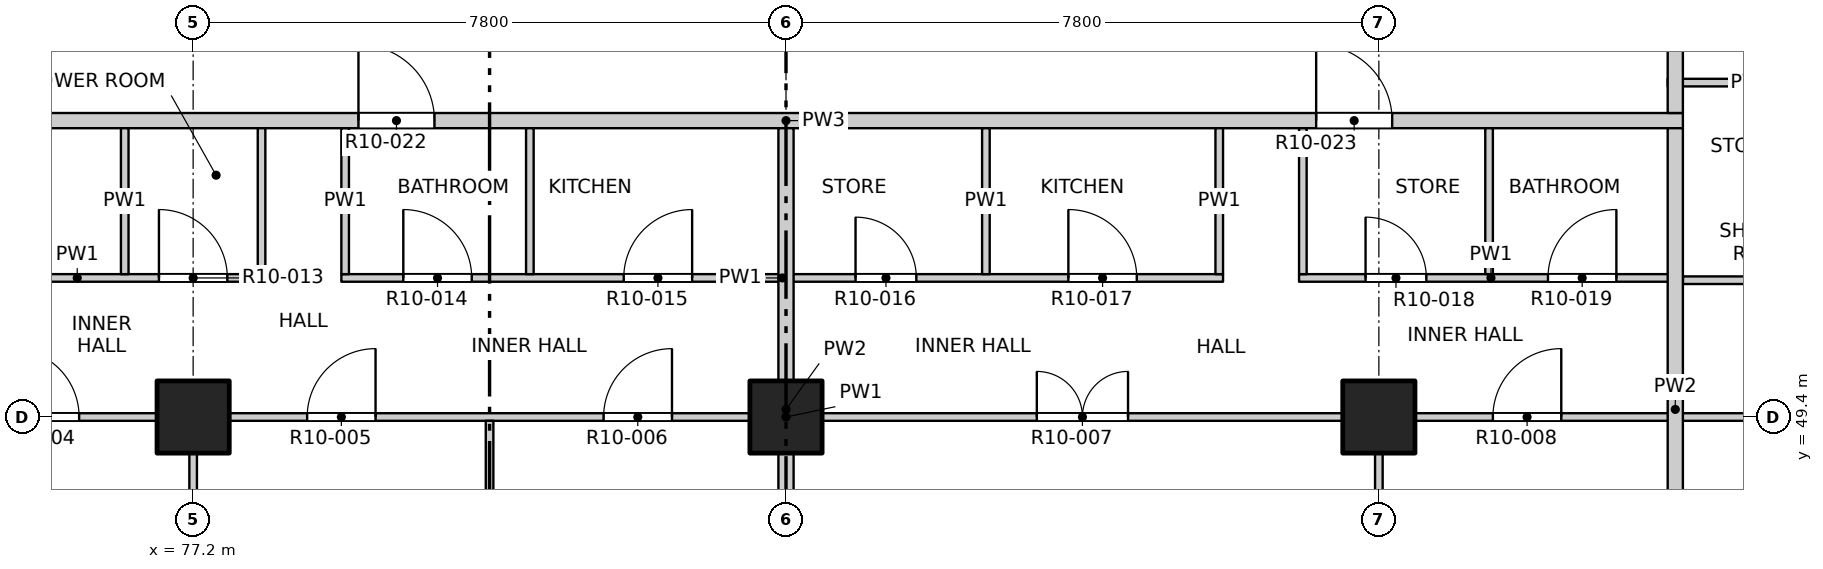
"""IFC4 building model, lengths in metres.
Left out: names, types, materials, properties, quantities, classifications, styles, units other than length and angle.
Written with IfcOpenShell. Run it as: python <this file> out.ifc"""

import sys

from ifc_helpers import new_model, si_unit, direction, frame, frame_2d, origin, origin_2d, place, context, subcontext, project, spatial, rectangle, extrude, element, fill, save


model = new_model("IFC4")
c1 = context("Model", 3, precision=1e-05, world=origin(), true_north=direction((0.0, 1.0)))
c2 = subcontext(c1, "Body", "Model", "MODEL_VIEW")
j1 = project(units=[si_unit("LENGTHUNIT", "METRE"), si_unit("PLANEANGLEUNIT", "RADIAN")], contexts=[c1])
p1 = place(None, origin())
s1 = spatial("IfcSite", under=j1, at=p1, CompositionType="ELEMENT")
p2 = place(p1, origin())
s2 = spatial("IfcBuilding", under=s1, at=p2, CompositionType="ELEMENT")
p3 = place(p2, frame((0.0, 0.0, 127.1)))
s3 = spatial("IfcBuildingStorey", under=s2, at=p3, CompositionType="ELEMENT", Elevation=127.1)
for number, where, z_axis, x_axis in (
    (1, (77.2, 49.4, -0.25), (0.0, 0.0, 1.0), (1.0, 0.0, 0.0)),
    (2, (85.0, 49.4, -0.25), (0.0, 0.0, 1.0), (1.0, 0.0, 0.0)),
    (3, (92.8, 49.4, -0.25), (0.0, 0.0, 1.0), (1.0, 0.0, 0.0)),
):
    element("IfcColumn", number, at=place(p3, frame(where, z_axis=z_axis, x_axis=x_axis)), inside=s3, PredefinedType="COLUMN", context=c2, shape_type="SweptSolid", body=[
        extrude(rectangle(XDim=0.95, YDim=0.95, at=origin_2d()), origin(), (0.0, 0.0, 1.0), 3.4),
    ])
p4 = place(p3, frame((65.8, 49.4, 0.0), z_axis=(0.0, 0.0, 1.0), x_axis=(1.0, 0.0, 0.0)))
e4 = element("IfcWall", 4, at=p4, inside=s3, PredefinedType="PARTITIONING", context=c2, shape_type="SweptSolid", body=[
    extrude(rectangle(XDim=38.4, YDim=0.1, at=frame_2d((19.2, 0.0))), origin(), (0.0, 0.0, 1.0), 3.15),
])
p5 = place(p4, frame((4.19, 0.0, 0.0)))
e5 = element("IfcOpeningElement", 5, at=p5, cuts=e4, PredefinedType="OPENING", context=c2, shape_type="SweptSolid", body=[
    extrude(rectangle(XDim=0.9, YDim=2.1, at=frame_2d((0.45, 1.05))), frame((0.0, 0.06, 0.0), z_axis=(0.0, -1.0, 0.0), x_axis=(1.0, 0.0, 0.0)), (0.0, 0.0, 1.0), 0.12),
])
p6 = place(p4, frame((9.0, 0.0, 0.0)))
e6 = element("IfcOpeningElement", 6, at=p6, cuts=e4, PredefinedType="OPENING", context=c2, shape_type="SweptSolid", body=[
    extrude(rectangle(XDim=0.9, YDim=2.1, at=frame_2d((0.45, 1.05))), frame((0.0, 0.06, 0.0), z_axis=(0.0, -1.0, 0.0), x_axis=(1.0, 0.0, 0.0)), (0.0, 0.0, 1.0), 0.12),
])
p7 = place(p4, frame((12.9, 0.0, 0.0)))
e7 = element("IfcOpeningElement", 7, at=p7, cuts=e4, PredefinedType="OPENING", context=c2, shape_type="SweptSolid", body=[
    extrude(rectangle(XDim=0.9, YDim=2.1, at=frame_2d((0.45, 1.05))), frame((0.0, 0.06, 0.0), z_axis=(0.0, -1.0, 0.0), x_axis=(1.0, 0.0, 0.0)), (0.0, 0.0, 1.0), 0.12),
])
p8 = place(p4, frame((16.8, 0.0, 0.0)))
e8 = element("IfcOpeningElement", 8, at=p8, cuts=e4, PredefinedType="OPENING", context=c2, shape_type="SweptSolid", body=[
    extrude(rectangle(XDim=0.9, YDim=2.1, at=frame_2d((0.45, 1.05))), frame((0.0, 0.06, 0.0), z_axis=(0.0, -1.0, 0.0), x_axis=(1.0, 0.0, 0.0)), (0.0, 0.0, 1.0), 0.12),
])
p9 = place(p4, frame((22.5, 0.0, 0.0)))
e9 = element("IfcOpeningElement", 9, at=p9, cuts=e4, PredefinedType="OPENING", context=c2, shape_type="SweptSolid", body=[
    extrude(rectangle(XDim=1.2, YDim=2.1, at=frame_2d((0.6, 1.05))), frame((0.0, 0.06, 0.0), z_axis=(0.0, -1.0, 0.0), x_axis=(1.0, 0.0, 0.0)), (0.0, 0.0, 1.0), 0.12),
])
p10 = place(p4, frame((28.5, 0.0, 0.0)))
e10 = element("IfcOpeningElement", 10, at=p10, cuts=e4, PredefinedType="OPENING", context=c2, shape_type="SweptSolid", body=[
    extrude(rectangle(XDim=0.9, YDim=2.1, at=frame_2d((0.45, 1.05))), frame((0.0, 0.06, 0.0), z_axis=(0.0, -1.0, 0.0), x_axis=(1.0, 0.0, 0.0)), (0.0, 0.0, 1.0), 0.12),
])
p11 = place(p4, frame((33.31, 0.0, 0.0)))
e11 = element("IfcOpeningElement", 11, at=p11, cuts=e4, PredefinedType="OPENING", context=c2, shape_type="SweptSolid", body=[
    extrude(rectangle(XDim=0.9, YDim=2.1, at=frame_2d((0.45, 1.05))), frame((0.0, 0.06, 0.0), z_axis=(0.0, -1.0, 0.0), x_axis=(1.0, 0.0, 0.0)), (0.0, 0.0, 1.0), 0.12),
])
p12 = place(p3, frame((96.8, 51.2, 0.0), z_axis=(0.0, 0.0, 1.0), x_axis=(1.0, 0.0, 0.0)))
e12 = element("IfcWall", 12, at=p12, inside=s3, PredefinedType="PARTITIONING", context=c2, shape_type="SweptSolid", body=[
    extrude(rectangle(XDim=2.02, YDim=0.1, at=frame_2d((1.01, 0.0))), origin(), (0.0, 0.0, 1.0), 3.15),
])
p13 = place(p3, frame((73.2, 51.23, 0.0), z_axis=(0.0, 0.0, 1.0), x_axis=(1.0, 0.0, 0.0)))
e13 = element("IfcWall", 13, at=p13, inside=s3, PredefinedType="PARTITIONING", context=c2, shape_type="SweptSolid", body=[
    extrude(rectangle(XDim=4.95, YDim=0.1, at=frame_2d((2.475, 0.0))), origin(), (0.0, 0.0, 1.0), 3.15),
])
p14 = place(p13, frame((1.2, 0.0, 0.0)))
e14 = element("IfcOpeningElement", 14, at=p14, cuts=e13, PredefinedType="OPENING", context=c2, shape_type="SweptSolid", body=[
    extrude(rectangle(XDim=0.8, YDim=2.1, at=frame_2d((0.4, 1.05))), frame((0.0, 0.06, 0.0), z_axis=(0.0, -1.0, 0.0), x_axis=(1.0, 0.0, 0.0)), (0.0, 0.0, 1.0), 0.12),
])
p15 = place(p13, frame((3.55, 0.0, 0.0)))
e15 = element("IfcOpeningElement", 15, at=p15, cuts=e13, PredefinedType="OPENING", context=c2, shape_type="SweptSolid", body=[
    extrude(rectangle(XDim=0.9, YDim=2.1, at=frame_2d((0.45, 1.05))), frame((0.0, 0.06, 0.0), z_axis=(0.0, -1.0, 0.0), x_axis=(1.0, 0.0, 0.0)), (0.0, 0.0, 1.0), 0.12),
])
p16 = place(p3, frame((79.15, 51.23, 0.0), z_axis=(0.0, 0.0, 1.0), x_axis=(1.0, 0.0, 0.0)))
e16 = element("IfcWall", 16, at=p16, inside=s3, PredefinedType="PARTITIONING", context=c2, shape_type="SweptSolid", body=[
    extrude(rectangle(XDim=11.6, YDim=0.1, at=frame_2d((5.8, 0.0))), origin(), (0.0, 0.0, 1.0), 3.15),
])
p17 = place(p16, frame((0.815, 0.0, 0.0)))
e17 = element("IfcOpeningElement", 17, at=p17, cuts=e16, PredefinedType="OPENING", context=c2, shape_type="SweptSolid", body=[
    extrude(rectangle(XDim=0.9, YDim=2.1, at=frame_2d((0.45, 1.05))), frame((0.0, 0.06, 0.0), z_axis=(0.0, -1.0, 0.0), x_axis=(1.0, 0.0, 0.0)), (0.0, 0.0, 1.0), 0.12),
])
p18 = place(p16, frame((3.715, 0.0, 0.0)))
e18 = element("IfcOpeningElement", 18, at=p18, cuts=e16, PredefinedType="OPENING", context=c2, shape_type="SweptSolid", body=[
    extrude(rectangle(XDim=0.9, YDim=2.1, at=frame_2d((0.45, 1.05))), frame((0.0, 0.06, 0.0), z_axis=(0.0, -1.0, 0.0), x_axis=(1.0, 0.0, 0.0)), (0.0, 0.0, 1.0), 0.12),
])
p19 = place(p16, frame((6.765, 0.0, 0.0)))
e19 = element("IfcOpeningElement", 19, at=p19, cuts=e16, PredefinedType="OPENING", context=c2, shape_type="SweptSolid", body=[
    extrude(rectangle(XDim=0.8, YDim=2.1, at=frame_2d((0.4, 1.05))), frame((0.0, 0.06, 0.0), z_axis=(0.0, -1.0, 0.0), x_axis=(1.0, 0.0, 0.0)), (0.0, 0.0, 1.0), 0.12),
])
p20 = place(p16, frame((9.565, 0.0, 0.0)))
e20 = element("IfcOpeningElement", 20, at=p20, cuts=e16, PredefinedType="OPENING", context=c2, shape_type="SweptSolid", body=[
    extrude(rectangle(XDim=0.9, YDim=2.1, at=frame_2d((0.45, 1.05))), frame((0.0, 0.06, 0.0), z_axis=(0.0, -1.0, 0.0), x_axis=(1.0, 0.0, 0.0)), (0.0, 0.0, 1.0), 0.12),
])
p21 = place(p3, frame((91.75, 51.23, 0.0), z_axis=(0.0, 0.0, 1.0), x_axis=(1.0, 0.0, 0.0)))
e21 = element("IfcWall", 21, at=p21, inside=s3, PredefinedType="PARTITIONING", context=c2, shape_type="SweptSolid", body=[
    extrude(rectangle(XDim=5.05, YDim=0.1, at=frame_2d((2.525, 0.0))), origin(), (0.0, 0.0, 1.0), 3.15),
])
p22 = place(p21, frame((0.875, 0.0, 0.0)))
e22 = element("IfcOpeningElement", 22, at=p22, cuts=e21, PredefinedType="OPENING", context=c2, shape_type="SweptSolid", body=[
    extrude(rectangle(XDim=0.8, YDim=2.1, at=frame_2d((0.4, 1.05))), frame((0.0, 0.06, 0.0), z_axis=(0.0, -1.0, 0.0), x_axis=(1.0, 0.0, 0.0)), (0.0, 0.0, 1.0), 0.12),
])
p23 = place(p21, frame((3.275, 0.0, 0.0)))
e23 = element("IfcOpeningElement", 23, at=p23, cuts=e21, PredefinedType="OPENING", context=c2, shape_type="SweptSolid", body=[
    extrude(rectangle(XDim=0.9, YDim=2.1, at=frame_2d((0.45, 1.05))), frame((0.0, 0.06, 0.0), z_axis=(0.0, -1.0, 0.0), x_axis=(1.0, 0.0, 0.0)), (0.0, 0.0, 1.0), 0.12),
])
p24 = place(p3, frame((73.2, 53.3, 0.0), z_axis=(0.0, 0.0, 1.0), x_axis=(1.0, 0.0, 0.0)))
e24 = element("IfcWall", 24, at=p24, inside=s3, PredefinedType="PARTITIONING", context=c2, shape_type="SweptSolid", body=[
    extrude(rectangle(XDim=23.6, YDim=0.2, at=frame_2d((11.8, 0.0))), origin(), (0.0, 0.0, 1.0), 3.15),
])
p25 = place(p24, frame((6.175, 0.0, 0.0)))
e25 = element("IfcOpeningElement", 25, at=p25, cuts=e24, PredefinedType="OPENING", context=c2, shape_type="SweptSolid", body=[
    extrude(rectangle(XDim=1.0, YDim=2.1, at=frame_2d((0.5, 1.05))), frame((0.0, 0.11, 0.0), z_axis=(0.0, -1.0, 0.0), x_axis=(1.0, 0.0, 0.0)), (0.0, 0.0, 1.0), 0.22),
])
p26 = place(p24, frame((18.775, 0.0, 0.0)))
e26 = element("IfcOpeningElement", 26, at=p26, cuts=e24, PredefinedType="OPENING", context=c2, shape_type="SweptSolid", body=[
    extrude(rectangle(XDim=1.0, YDim=2.1, at=frame_2d((0.5, 1.05))), frame((0.0, 0.11, 0.0), z_axis=(0.0, -1.0, 0.0), x_axis=(1.0, 0.0, 0.0)), (0.0, 0.0, 1.0), 0.22),
])
p27 = place(p3, frame((96.6, 53.8, 0.0), z_axis=(0.0, 0.0, 1.0), x_axis=(1.0, 0.0, 0.0)))
e27 = element("IfcWall", 27, at=p27, inside=s3, PredefinedType="PARTITIONING", context=c2, shape_type="SweptSolid", body=[
    extrude(rectangle(XDim=2.22, YDim=0.1, at=frame_2d((1.11, 0.0))), origin(), (0.0, 0.0, 1.0), 3.15),
])
p28 = place(p3, frame((76.3, 51.28, 0.0), z_axis=(0.0, 0.0, 1.0), x_axis=(0.0, 1.0, 0.0)))
e28 = element("IfcWall", 28, at=p28, inside=s3, PredefinedType="PARTITIONING", context=c2, shape_type="SweptSolid", body=[
    extrude(rectangle(XDim=1.92, YDim=0.1, at=frame_2d((0.96, 0.0))), origin(), (0.0, 0.0, 1.0), 3.15),
])
p29 = place(p3, frame((77.2, 45.8, 0.0), z_axis=(0.0, 0.0, 1.0), x_axis=(0.0, 1.0, 0.0)))
e29 = element("IfcWall", 29, at=p29, inside=s3, PredefinedType="PARTITIONING", context=c2, shape_type="SweptSolid", body=[
    extrude(rectangle(XDim=3.55, YDim=0.1, at=frame_2d((1.775, 0.0))), origin(), (0.0, 0.0, 1.0), 3.15),
])
for number, where, z_axis, x_axis in (
    (30, (78.1, 51.28, 0.0), (0.0, 0.0, 1.0), (0.0, 1.0, 0.0)),
    (31, (79.2, 51.28, 0.0), (0.0, 0.0, 1.0), (0.0, 1.0, 0.0)),
):
    element("IfcWall", number, at=place(p3, frame(where, z_axis=z_axis, x_axis=x_axis)), inside=s3, PredefinedType="PARTITIONING", context=c2, shape_type="SweptSolid", body=[
        extrude(rectangle(XDim=1.92, YDim=0.1, at=frame_2d((0.96, 0.0))), origin(), (0.0, 0.0, 1.0), 3.15),
    ])
p30 = place(p3, frame((81.1, 45.8, 0.0), z_axis=(0.0, 0.0, 1.0), x_axis=(0.0, 1.0, 0.0)))
e32 = element("IfcWall", 32, at=p30, inside=s3, PredefinedType="PARTITIONING", context=c2, shape_type="SweptSolid", body=[
    extrude(rectangle(XDim=3.55, YDim=0.1, at=frame_2d((1.775, 0.0))), origin(), (0.0, 0.0, 1.0), 2.55),
])
p31 = place(p3, frame((81.63, 51.28, 0.0), z_axis=(0.0, 0.0, 1.0), x_axis=(0.0, 1.0, 0.0)))
e33 = element("IfcWall", 33, at=p31, inside=s3, PredefinedType="PARTITIONING", context=c2, shape_type="SweptSolid", body=[
    extrude(rectangle(XDim=1.92, YDim=0.1, at=frame_2d((0.96, 0.0))), origin(), (0.0, 0.0, 1.0), 3.15),
])
p32 = place(p3, frame((85.0, 45.8, 0.0), z_axis=(0.0, 0.0, 1.0), x_axis=(0.0, 1.0, 0.0)))
e34 = element("IfcWall", 34, at=p32, inside=s3, PredefinedType="PARTITIONING", context=c2, shape_type="SweptSolid", body=[
    extrude(rectangle(XDim=7.4, YDim=0.2, at=frame_2d((3.7, 0.0))), origin(), (0.0, 0.0, 1.0), 3.15),
])
for number, where, z_axis, x_axis in (
    (35, (87.63, 51.28, 0.0), (0.0, 0.0, 1.0), (0.0, 1.0, 0.0)),
    (36, (90.7, 51.28, 0.0), (0.0, 0.0, 1.0), (0.0, 1.0, 0.0)),
    (37, (91.8, 51.28, 0.0), (0.0, 0.0, 1.0), (0.0, 1.0, 0.0)),
):
    element("IfcWall", number, at=place(p3, frame(where, z_axis=z_axis, x_axis=x_axis)), inside=s3, PredefinedType="PARTITIONING", context=c2, shape_type="SweptSolid", body=[
        extrude(rectangle(XDim=1.92, YDim=0.1, at=frame_2d((0.96, 0.0))), origin(), (0.0, 0.0, 1.0), 3.15),
    ])
p33 = place(p3, frame((92.8, 45.8, 0.0), z_axis=(0.0, 0.0, 1.0), x_axis=(0.0, 1.0, 0.0)))
e38 = element("IfcWall", 38, at=p33, inside=s3, PredefinedType="PARTITIONING", context=c2, shape_type="SweptSolid", body=[
    extrude(rectangle(XDim=3.55, YDim=0.1, at=frame_2d((1.775, 0.0))), origin(), (0.0, 0.0, 1.0), 3.15),
])
p34 = place(p3, frame((94.25, 51.28, 0.0), z_axis=(0.0, 0.0, 1.0), x_axis=(0.0, 1.0, 0.0)))
e39 = element("IfcWall", 39, at=p34, inside=s3, PredefinedType="PARTITIONING", context=c2, shape_type="SweptSolid", body=[
    extrude(rectangle(XDim=1.92, YDim=0.1, at=frame_2d((0.96, 0.0))), origin(), (0.0, 0.0, 1.0), 3.15),
])
p35 = place(p3, frame((96.7, 45.8, 0.0), z_axis=(0.0, 0.0, 1.0), x_axis=(0.0, 1.0, 0.0)))
e40 = element("IfcWall", 40, at=p35, inside=s3, PredefinedType="PARTITIONING", context=c2, shape_type="SweptSolid", body=[
    extrude(rectangle(XDim=7.4, YDim=0.2, at=frame_2d((3.7, 0.0))), origin(), (0.0, 0.0, 1.0), 3.15),
])
p36 = place(p3, frame((96.7, 53.4, 0.0), z_axis=(0.0, 0.0, 1.0), x_axis=(0.0, 1.0, 0.0)))
e41 = element("IfcWall", 41, at=p36, inside=s3, PredefinedType="PARTITIONING", context=c2, shape_type="SweptSolid", body=[
    extrude(rectangle(XDim=30.8, YDim=0.2, at=frame_2d((15.4, 0.0))), origin(), (0.0, 0.0, 1.0), 3.15),
])
p37 = place(p36, frame((9.725, 0.0, 0.0)))
e42 = element("IfcOpeningElement", 42, at=p37, cuts=e41, PredefinedType="OPENING", context=c2, shape_type="SweptSolid", body=[
    extrude(rectangle(XDim=1.0, YDim=2.1, at=frame_2d((0.5, 1.05))), frame((0.0, 0.11, 0.0), z_axis=(0.0, -1.0, 0.0), x_axis=(1.0, 0.0, 0.0)), (0.0, 0.0, 1.0), 0.22),
])
p38 = place(p36, frame((14.775, 0.0, 0.0)))
e43 = element("IfcOpeningElement", 43, at=p38, cuts=e41, PredefinedType="OPENING", context=c2, shape_type="SweptSolid", body=[
    extrude(rectangle(XDim=1.0, YDim=2.1, at=frame_2d((0.5, 1.05))), frame((0.0, 0.11, 0.0), z_axis=(0.0, -1.0, 0.0), x_axis=(1.0, 0.0, 0.0)), (0.0, 0.0, 1.0), 0.22),
])
p39 = place(p6, origin())
e44 = element("IfcDoor", 44, at=p39, inside=s3, OperationType="SINGLE_SWING_LEFT", PredefinedType="DOOR", context=c2, shape_type="SweptSolid", body=[
    extrude(rectangle(XDim=0.9, YDim=2.1, at=frame_2d((0.45, 1.05))), frame((0.0, 0.025, 0.0), z_axis=(0.0, -1.0, 0.0), x_axis=(1.0, 0.0, 0.0)), (0.0, 0.0, 1.0), 0.05),
])
fill(e6, e44)
p40 = place(p7, origin())
e45 = element("IfcDoor", 45, at=p40, inside=s3, OperationType="SINGLE_SWING_RIGHT", PredefinedType="DOOR", context=c2, shape_type="SweptSolid", body=[
    extrude(rectangle(XDim=0.9, YDim=2.1, at=frame_2d((0.45, 1.05))), frame((0.0, 0.025, 0.0), z_axis=(0.0, -1.0, 0.0), x_axis=(1.0, 0.0, 0.0)), (0.0, 0.0, 1.0), 0.05),
])
fill(e7, e45)
p41 = place(p8, origin())
e46 = element("IfcDoor", 46, at=p41, inside=s3, OperationType="SINGLE_SWING_RIGHT", PredefinedType="DOOR", context=c2, shape_type="SweptSolid", body=[
    extrude(rectangle(XDim=0.9, YDim=2.1, at=frame_2d((0.45, 1.05))), frame((0.0, 0.025, 0.0), z_axis=(0.0, -1.0, 0.0), x_axis=(1.0, 0.0, 0.0)), (0.0, 0.0, 1.0), 0.05),
])
fill(e8, e46)
p42 = place(p9, origin())
e47 = element("IfcDoor", 47, at=p42, inside=s3, OperationType="DOUBLE_DOOR_SINGLE_SWING", PredefinedType="DOOR", context=c2, shape_type="SweptSolid", body=[
    extrude(rectangle(XDim=1.2, YDim=2.1, at=frame_2d((0.6, 1.05))), frame((0.0, 0.025, 0.0), z_axis=(0.0, -1.0, 0.0), x_axis=(1.0, 0.0, 0.0)), (0.0, 0.0, 1.0), 0.05),
])
fill(e9, e47)
p43 = place(p10, origin())
e48 = element("IfcDoor", 48, at=p43, inside=s3, OperationType="SINGLE_SWING_RIGHT", PredefinedType="DOOR", context=c2, shape_type="SweptSolid", body=[
    extrude(rectangle(XDim=0.9, YDim=2.1, at=frame_2d((0.45, 1.05))), frame((0.0, 0.025, 0.0), z_axis=(0.0, -1.0, 0.0), x_axis=(1.0, 0.0, 0.0)), (0.0, 0.0, 1.0), 0.05),
])
fill(e10, e48)
p44 = place(p15, origin())
e49 = element("IfcDoor", 49, at=p44, inside=s3, OperationType="SINGLE_SWING_LEFT", PredefinedType="DOOR", context=c2, shape_type="SweptSolid", body=[
    extrude(rectangle(XDim=0.9, YDim=2.1, at=frame_2d((0.45, 1.05))), frame((0.0, 0.025, 0.0), z_axis=(0.0, -1.0, 0.0), x_axis=(1.0, 0.0, 0.0)), (0.0, 0.0, 1.0), 0.05),
])
fill(e15, e49)
p45 = place(p17, origin())
e50 = element("IfcDoor", 50, at=p45, inside=s3, OperationType="SINGLE_SWING_LEFT", PredefinedType="DOOR", context=c2, shape_type="SweptSolid", body=[
    extrude(rectangle(XDim=0.9, YDim=2.1, at=frame_2d((0.45, 1.05))), frame((0.0, 0.025, 0.0), z_axis=(0.0, -1.0, 0.0), x_axis=(1.0, 0.0, 0.0)), (0.0, 0.0, 1.0), 0.05),
])
fill(e17, e50)
p46 = place(p18, origin())
e51 = element("IfcDoor", 51, at=p46, inside=s3, OperationType="SINGLE_SWING_RIGHT", PredefinedType="DOOR", context=c2, shape_type="SweptSolid", body=[
    extrude(rectangle(XDim=0.9, YDim=2.1, at=frame_2d((0.45, 1.05))), frame((0.0, 0.025, 0.0), z_axis=(0.0, -1.0, 0.0), x_axis=(1.0, 0.0, 0.0)), (0.0, 0.0, 1.0), 0.05),
])
fill(e18, e51)
p47 = place(p19, origin())
e52 = element("IfcDoor", 52, at=p47, inside=s3, OperationType="SINGLE_SWING_LEFT", PredefinedType="DOOR", context=c2, shape_type="SweptSolid", body=[
    extrude(rectangle(XDim=0.8, YDim=2.1, at=frame_2d((0.4, 1.05))), frame((0.0, 0.025, 0.0), z_axis=(0.0, -1.0, 0.0), x_axis=(1.0, 0.0, 0.0)), (0.0, 0.0, 1.0), 0.05),
])
fill(e19, e52)
p48 = place(p20, origin())
e53 = element("IfcDoor", 53, at=p48, inside=s3, OperationType="SINGLE_SWING_LEFT", PredefinedType="DOOR", context=c2, shape_type="SweptSolid", body=[
    extrude(rectangle(XDim=0.9, YDim=2.1, at=frame_2d((0.45, 1.05))), frame((0.0, 0.025, 0.0), z_axis=(0.0, -1.0, 0.0), x_axis=(1.0, 0.0, 0.0)), (0.0, 0.0, 1.0), 0.05),
])
fill(e20, e53)
p49 = place(p22, origin())
e54 = element("IfcDoor", 54, at=p49, inside=s3, OperationType="SINGLE_SWING_LEFT", PredefinedType="DOOR", context=c2, shape_type="SweptSolid", body=[
    extrude(rectangle(XDim=0.8, YDim=2.1, at=frame_2d((0.4, 1.05))), frame((0.0, 0.025, 0.0), z_axis=(0.0, -1.0, 0.0), x_axis=(1.0, 0.0, 0.0)), (0.0, 0.0, 1.0), 0.05),
])
fill(e22, e54)
p50 = place(p23, origin())
e55 = element("IfcDoor", 55, at=p50, inside=s3, OperationType="SINGLE_SWING_RIGHT", PredefinedType="DOOR", context=c2, shape_type="SweptSolid", body=[
    extrude(rectangle(XDim=0.9, YDim=2.1, at=frame_2d((0.45, 1.05))), frame((0.0, 0.025, 0.0), z_axis=(0.0, -1.0, 0.0), x_axis=(1.0, 0.0, 0.0)), (0.0, 0.0, 1.0), 0.05),
])
fill(e23, e55)
p51 = place(p25, origin())
e56 = element("IfcDoor", 56, at=p51, inside=s3, OperationType="SINGLE_SWING_LEFT", PredefinedType="DOOR", context=c2, shape_type="SweptSolid", body=[
    extrude(rectangle(XDim=1.0, YDim=2.1, at=frame_2d((0.5, 1.05))), frame((0.0, 0.025, 0.0), z_axis=(0.0, -1.0, 0.0), x_axis=(1.0, 0.0, 0.0)), (0.0, 0.0, 1.0), 0.05),
])
fill(e25, e56)
p52 = place(p26, origin())
e57 = element("IfcDoor", 57, at=p52, inside=s3, OperationType="SINGLE_SWING_LEFT", PredefinedType="DOOR", context=c2, shape_type="SweptSolid", body=[
    extrude(rectangle(XDim=1.0, YDim=2.1, at=frame_2d((0.5, 1.05))), frame((0.0, 0.025, 0.0), z_axis=(0.0, -1.0, 0.0), x_axis=(1.0, 0.0, 0.0)), (0.0, 0.0, 1.0), 0.05),
])
fill(e26, e57)
save(model, sys.argv[1])
